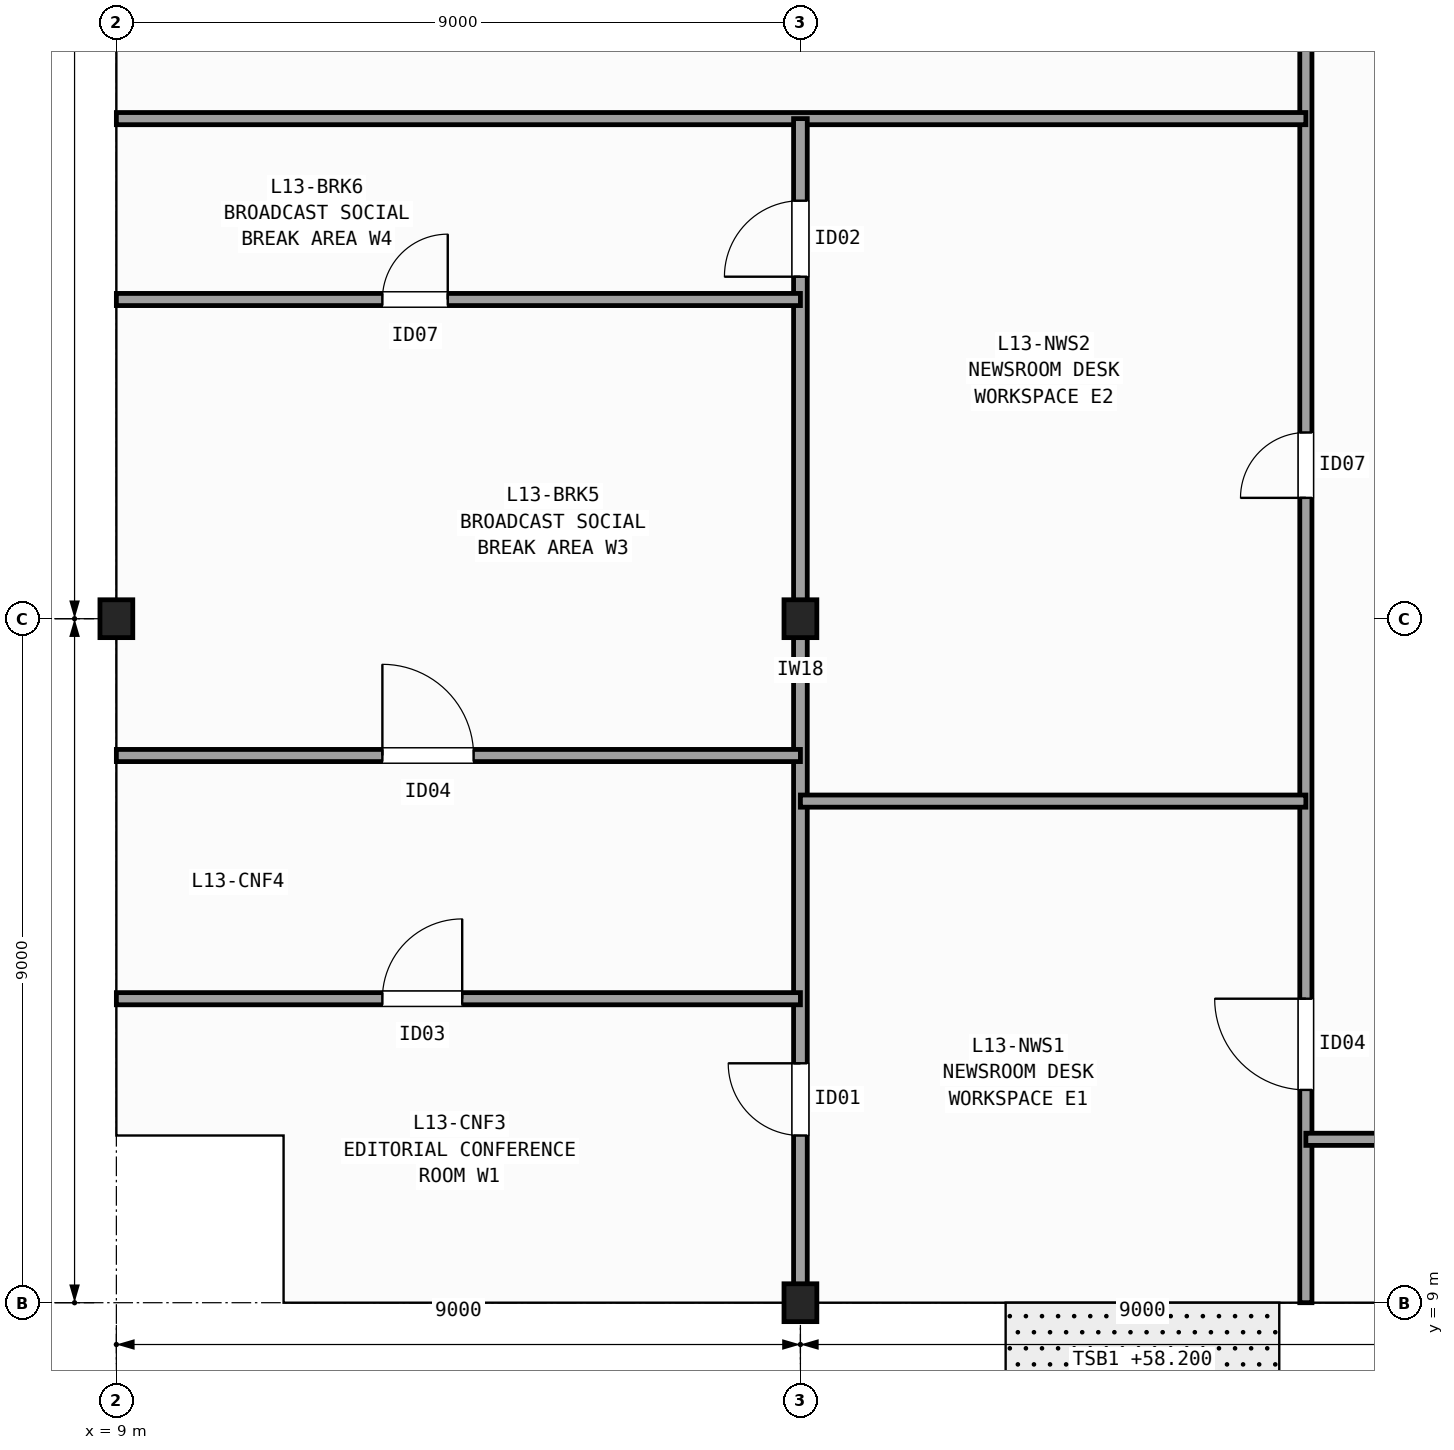
"""IFC4 building model, lengths in metres.
Left out: names, types, materials, properties, quantities, classifications, styles, units other than length and angle.
Written with IfcOpenShell. Run it as: python <this file> out.ifc"""

import sys

from ifc_helpers import new_model, si_unit, direction, frame, frame_2d, origin, origin_2d, place, context, subcontext, project, spatial, rectangle, i_section, extrude, element, fill, save


model = new_model("IFC4")
c1 = context("Model", 3, precision=1e-05, world=origin(), true_north=direction((0.0, 1.0)))
c2 = subcontext(c1, "Body", "Model", "MODEL_VIEW")
j1 = project(units=[si_unit("LENGTHUNIT", "METRE"), si_unit("PLANEANGLEUNIT", "RADIAN")], contexts=[c1])
p1 = place(None, origin())
s1 = spatial("IfcSite", under=j1, at=p1, CompositionType="ELEMENT")
p2 = place(p1, origin())
s2 = spatial("IfcBuilding", under=s1, at=p2, CompositionType="ELEMENT")
p3 = place(p2, frame((0.0, 0.0, 58.2)))
s3 = spatial("IfcBuildingStorey", under=s2, at=p3, CompositionType="ELEMENT", Elevation=58.2)
for number, where, z_axis, x_axis in (
    (1, (9.0, 18.0, 0.0), (0.0, 0.0, 1.0), (1.0, 0.0, 0.0)),
    (2, (18.0, 9.0, 0.0), (0.0, 0.0, 1.0), (1.0, 0.0, 0.0)),
    (3, (18.0, 18.0, 0.0), (0.0, 0.0, 1.0), (1.0, 0.0, 0.0)),
):
    element("IfcColumn", number, at=place(p3, frame(where, z_axis=z_axis, x_axis=x_axis)), inside=s3, PredefinedType="COLUMN", context=c2, shape_type="SweptSolid", body=[
        extrude(i_section(OverallWidth=0.432, OverallDepth=0.498, WebThickness=0.056, FlangeThickness=0.089, FilletRadius=0.015, at=origin_2d()), origin(), (0.0, 0.0, 1.0), 3.7),
    ])
p4 = place(p3, frame((24.65, 9.0, 0.0), z_axis=(0.0, 0.0, 1.0), x_axis=(0.0, 1.0, 0.0)))
e4 = element("IfcWall", 4, at=p4, inside=s3, PredefinedType="PARTITIONING", context=c2, shape_type="SweptSolid", body=[
    extrude(rectangle(XDim=19.2, YDim=0.16, at=frame_2d((9.6, 0.0))), origin(), (0.0, 0.0, 1.0), 2.627),
])
p5 = place(p4, frame((2.8, 0.0, 0.0)))
e5 = element("IfcOpeningElement", 5, at=p5, cuts=e4, PredefinedType="OPENING", context=c2, shape_type="SweptSolid", body=[
    extrude(rectangle(XDim=1.2, YDim=2.15, at=frame_2d((0.6, 1.075))), frame((0.0, 0.09, 0.0), z_axis=(0.0, -1.0, 0.0), x_axis=(1.0, 0.0, 0.0)), (0.0, 0.0, 1.0), 0.18),
])
p6 = place(p4, frame((10.59, 0.0, 0.0)))
e6 = element("IfcOpeningElement", 6, at=p6, cuts=e4, PredefinedType="OPENING", context=c2, shape_type="SweptSolid", body=[
    extrude(rectangle(XDim=0.86, YDim=2.05, at=frame_2d((0.43, 1.025))), frame((0.0, 0.09, 0.0), z_axis=(0.0, -1.0, 0.0), x_axis=(1.0, 0.0, 0.0)), (0.0, 0.0, 1.0), 0.18),
])
p7 = place(p3, frame((9.0, 24.58, 0.0), z_axis=(0.0, 0.0, 1.0), x_axis=(1.0, 0.0, 0.0)))
e7 = element("IfcWall", 7, at=p7, inside=s3, PredefinedType="PARTITIONING", context=c2, shape_type="SweptSolid", body=[
    extrude(rectangle(XDim=15.65, YDim=0.16, at=frame_2d((7.825, 0.0))), origin(), (0.0, 0.0, 1.0), 2.627),
])
p8 = place(p3, frame((18.0, 9.0, 0.0), z_axis=(0.0, 0.0, 1.0), x_axis=(0.0, 1.0, 0.0)))
e8 = element("IfcWall", 8, at=p8, inside=s3, PredefinedType="PARTITIONING", context=c2, shape_type="SweptSolid", body=[
    extrude(rectangle(XDim=15.58, YDim=0.18, at=frame_2d((7.79, 0.0))), origin(), (0.0, 0.0, 1.0), 2.627),
])
p9 = place(p8, frame((2.2, 0.0, 0.0)))
e9 = element("IfcOpeningElement", 9, at=p9, cuts=e8, PredefinedType="OPENING", context=c2, shape_type="SweptSolid", body=[
    extrude(rectangle(XDim=0.95, YDim=2.1, at=frame_2d((0.475, 1.05))), frame((0.0, 0.1, 0.0), z_axis=(0.0, -1.0, 0.0), x_axis=(1.0, 0.0, 0.0)), (0.0, 0.0, 1.0), 0.2),
])
p10 = place(p8, frame((13.5, 0.0, 0.0)))
e10 = element("IfcOpeningElement", 10, at=p10, cuts=e8, PredefinedType="OPENING", context=c2, shape_type="SweptSolid", body=[
    extrude(rectangle(XDim=1.0, YDim=2.1, at=frame_2d((0.5, 1.05))), frame((0.0, 0.1, 0.0), z_axis=(0.0, -1.0, 0.0), x_axis=(1.0, 0.0, 0.0)), (0.0, 0.0, 1.0), 0.2),
])
p11 = place(p3, frame((18.0, 15.6, 0.0), z_axis=(0.0, 0.0, 1.0), x_axis=(1.0, 0.0, 0.0)))
e11 = element("IfcWall", 11, at=p11, inside=s3, PredefinedType="PARTITIONING", context=c2, shape_type="SweptSolid", body=[
    extrude(rectangle(XDim=6.65, YDim=0.16, at=frame_2d((3.325, 0.0))), origin(), (0.0, 0.0, 1.0), 2.792),
])
p12 = place(p3, frame((9.0, 13.0, 0.0), z_axis=(0.0, 0.0, 1.0), x_axis=(1.0, 0.0, 0.0)))
e12 = element("IfcWall", 12, at=p12, inside=s3, PredefinedType="PARTITIONING", context=c2, shape_type="SweptSolid", body=[
    extrude(rectangle(XDim=9.0, YDim=0.16, at=frame_2d((4.5, 0.0))), origin(), (0.0, 0.0, 1.0), 2.792),
])
p13 = place(p12, frame((3.5, 0.0, 0.0)))
e13 = element("IfcOpeningElement", 13, at=p13, cuts=e12, PredefinedType="OPENING", context=c2, shape_type="SweptSolid", body=[
    extrude(rectangle(XDim=1.05, YDim=2.15, at=frame_2d((0.525, 1.075))), frame((0.0, 0.09, 0.0), z_axis=(0.0, -1.0, 0.0), x_axis=(1.0, 0.0, 0.0)), (0.0, 0.0, 1.0), 0.18),
])
p14 = place(p3, frame((9.0, 16.2, 0.0), z_axis=(0.0, 0.0, 1.0), x_axis=(1.0, 0.0, 0.0)))
e14 = element("IfcWall", 14, at=p14, inside=s3, PredefinedType="PARTITIONING", context=c2, shape_type="SweptSolid", body=[
    extrude(rectangle(XDim=9.0, YDim=0.16, at=frame_2d((4.5, 0.0))), origin(), (0.0, 0.0, 1.0), 2.792),
])
p15 = place(p14, frame((3.5, 0.0, 0.0)))
e15 = element("IfcOpeningElement", 15, at=p15, cuts=e14, PredefinedType="OPENING", context=c2, shape_type="SweptSolid", body=[
    extrude(rectangle(XDim=1.2, YDim=2.15, at=frame_2d((0.6, 1.075))), frame((0.0, 0.09, 0.0), z_axis=(0.0, -1.0, 0.0), x_axis=(1.0, 0.0, 0.0)), (0.0, 0.0, 1.0), 0.18),
])
p16 = place(p3, frame((9.0, 22.2, 0.0), z_axis=(0.0, 0.0, 1.0), x_axis=(1.0, 0.0, 0.0)))
e16 = element("IfcWall", 16, at=p16, inside=s3, PredefinedType="PARTITIONING", context=c2, shape_type="SweptSolid", body=[
    extrude(rectangle(XDim=9.0, YDim=0.16, at=frame_2d((4.5, 0.0))), origin(), (0.0, 0.0, 1.0), 2.627),
])
p17 = place(p16, frame((3.5, 0.0, 0.0)))
e17 = element("IfcOpeningElement", 17, at=p17, cuts=e16, PredefinedType="OPENING", context=c2, shape_type="SweptSolid", body=[
    extrude(rectangle(XDim=0.86, YDim=2.05, at=frame_2d((0.43, 1.025))), frame((0.0, 0.09, 0.0), z_axis=(0.0, -1.0, 0.0), x_axis=(1.0, 0.0, 0.0)), (0.0, 0.0, 1.0), 0.18),
])
p18 = place(p3, frame((24.65, 11.15, 0.0), z_axis=(0.0, 0.0, 1.0), x_axis=(1.0, 0.0, 0.0)))
e18 = element("IfcWall", 18, at=p18, inside=s3, PredefinedType="PARTITIONING", context=c2, shape_type="SweptSolid", body=[
    extrude(rectangle(XDim=4.75, YDim=0.16, at=frame_2d((2.375, 0.0))), origin(), (0.0, 0.0, 1.0), 2.792),
])
p19 = place(p18, frame((1.2, 0.0, 0.0)))
e19 = element("IfcOpeningElement", 19, at=p19, cuts=e18, PredefinedType="OPENING", context=c2, shape_type="SweptSolid", body=[
    extrude(rectangle(XDim=1.2, YDim=2.15, at=frame_2d((0.6, 1.075))), frame((0.0, 0.09, 0.0), z_axis=(0.0, -1.0, 0.0), x_axis=(1.0, 0.0, 0.0)), (0.0, 0.0, 1.0), 0.18),
])
p20 = place(p5, origin())
e20 = element("IfcDoor", 20, at=p20, inside=s3, OperationType="SINGLE_SWING_RIGHT", PredefinedType="DOOR", context=c2, shape_type="SweptSolid", body=[
    extrude(rectangle(XDim=1.2, YDim=2.15, at=frame_2d((0.6, 1.075))), frame((0.0, 0.025, 0.0), z_axis=(0.0, -1.0, 0.0), x_axis=(1.0, 0.0, 0.0)), (0.0, 0.0, 1.0), 0.05),
])
fill(e5, e20)
p21 = place(p6, origin())
e21 = element("IfcDoor", 21, at=p21, inside=s3, OperationType="SINGLE_SWING_LEFT", PredefinedType="DOOR", context=c2, shape_type="SweptSolid", body=[
    extrude(rectangle(XDim=0.86, YDim=2.05, at=frame_2d((0.43, 1.025))), frame((0.0, 0.025, 0.0), z_axis=(0.0, -1.0, 0.0), x_axis=(1.0, 0.0, 0.0)), (0.0, 0.0, 1.0), 0.05),
])
fill(e6, e21)
p22 = place(p9, origin())
e22 = element("IfcDoor", 22, at=p22, inside=s3, OperationType="SINGLE_SWING_RIGHT", PredefinedType="DOOR", context=c2, shape_type="SweptSolid", body=[
    extrude(rectangle(XDim=0.95, YDim=2.1, at=frame_2d((0.475, 1.05))), frame((0.0, 0.025, 0.0), z_axis=(0.0, -1.0, 0.0), x_axis=(1.0, 0.0, 0.0)), (0.0, 0.0, 1.0), 0.05),
])
fill(e9, e22)
p23 = place(p10, origin())
e23 = element("IfcDoor", 23, at=p23, inside=s3, OperationType="SINGLE_SWING_LEFT", PredefinedType="DOOR", context=c2, shape_type="SweptSolid", body=[
    extrude(rectangle(XDim=1.0, YDim=2.1, at=frame_2d((0.5, 1.05))), frame((0.0, 0.025, 0.0), z_axis=(0.0, -1.0, 0.0), x_axis=(1.0, 0.0, 0.0)), (0.0, 0.0, 1.0), 0.05),
])
fill(e10, e23)
p24 = place(p13, origin())
e24 = element("IfcDoor", 24, at=p24, inside=s3, OperationType="SINGLE_SWING_RIGHT", PredefinedType="DOOR", context=c2, shape_type="SweptSolid", body=[
    extrude(rectangle(XDim=1.05, YDim=2.15, at=frame_2d((0.525, 1.075))), frame((0.0, 0.025, 0.0), z_axis=(0.0, -1.0, 0.0), x_axis=(1.0, 0.0, 0.0)), (0.0, 0.0, 1.0), 0.05),
])
fill(e13, e24)
p25 = place(p15, origin())
e25 = element("IfcDoor", 25, at=p25, inside=s3, OperationType="SINGLE_SWING_LEFT", PredefinedType="DOOR", context=c2, shape_type="SweptSolid", body=[
    extrude(rectangle(XDim=1.2, YDim=2.15, at=frame_2d((0.6, 1.075))), frame((0.0, 0.025, 0.0), z_axis=(0.0, -1.0, 0.0), x_axis=(1.0, 0.0, 0.0)), (0.0, 0.0, 1.0), 0.05),
])
fill(e15, e25)
p26 = place(p17, origin())
e26 = element("IfcDoor", 26, at=p26, inside=s3, OperationType="SINGLE_SWING_RIGHT", PredefinedType="DOOR", context=c2, shape_type="SweptSolid", body=[
    extrude(rectangle(XDim=0.86, YDim=2.05, at=frame_2d((0.43, 1.025))), frame((0.0, 0.025, 0.0), z_axis=(0.0, -1.0, 0.0), x_axis=(1.0, 0.0, 0.0)), (0.0, 0.0, 1.0), 0.05),
])
fill(e17, e26)
save(model, sys.argv[1])
